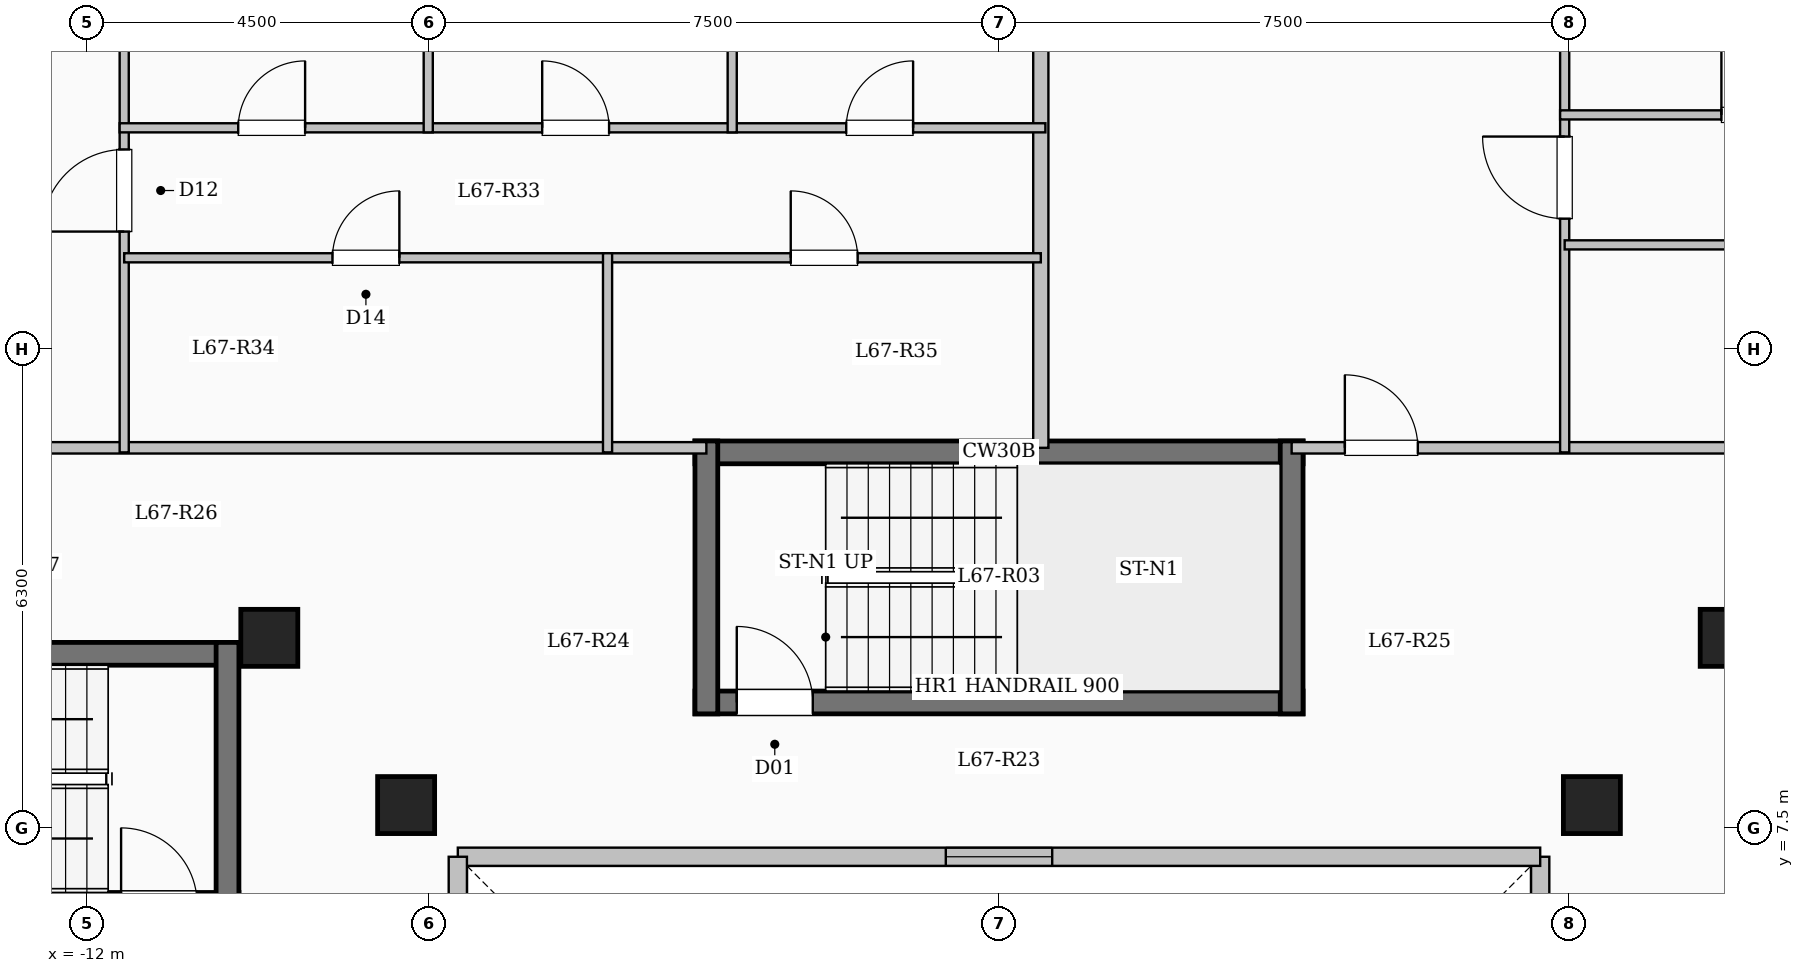
"""IFC4 building model, lengths in metres.
Left out: names, types, materials, properties, quantities, classifications, styles, units other than length and angle.
Written with IfcOpenShell. Run it as: python <this file> out.ifc"""

import sys

from ifc_helpers import new_model, si_unit, direction, frame, frame_2d, origin, origin_2d, place, context, subcontext, project, spatial, rectangle, extrude, element, fill, save


model = new_model("IFC4")
c1 = context("Model", 3, precision=1e-05, world=origin(), true_north=direction((0.0, 1.0)))
c2 = subcontext(c1, "Body", "Model", "MODEL_VIEW")
j1 = project(units=[si_unit("LENGTHUNIT", "METRE"), si_unit("PLANEANGLEUNIT", "RADIAN")], contexts=[c1])
p1 = place(None, origin())
s1 = spatial("IfcSite", under=j1, at=p1, CompositionType="ELEMENT")
p2 = place(p1, origin())
s2 = spatial("IfcBuilding", under=s1, at=p2, CompositionType="ELEMENT")
p3 = place(p2, frame((0.0, 0.0, 248.2)))
s3 = spatial("IfcBuildingStorey", under=s2, at=p3, CompositionType="ELEMENT", Elevation=248.2)
for number, where, z_axis, x_axis in (
    (1, (-7.8, 7.8, 0.0), (0.0, 0.0, 1.0), (1.0, 0.0, 0.0)),
    (2, (7.8, 7.8, 0.0), (0.0, 0.0, 1.0), (1.0, 0.0, 0.0)),
    (3, (-9.6, 10.0, 0.0), (0.0, 0.0, 1.0), (1.0, 0.0, 0.0)),
    (4, (9.6, 10.0, 0.0), (0.0, 0.0, 1.0), (1.0, 0.0, 0.0)),
):
    element("IfcColumn", number, at=place(p3, frame(where, z_axis=z_axis, x_axis=x_axis)), inside=s3, PredefinedType="COLUMN", context=c2, shape_type="SweptSolid", body=[
        extrude(rectangle(XDim=0.75, YDim=0.75, at=origin_2d()), origin(), (0.0, 0.0, 1.0), 3.35),
    ])
p4 = place(p3, frame((7.12, -7.12, 0.0), z_axis=(0.0, 0.0, 1.0), x_axis=(0.0, 1.0, 0.0)))
e5 = element("IfcWall", 5, at=p4, inside=s3, PredefinedType="SOLIDWALL", context=c2, shape_type="SweptSolid", body=[
    extrude(rectangle(XDim=14.24, YDim=0.24, at=frame_2d((7.12, 0.0))), origin(), (0.0, 0.0, 1.0), 3.1),
])
p5 = place(p4, frame((6.42, 0.0, 0.95)))
e6 = element("IfcOpeningElement", 6, at=p5, cuts=e5, PredefinedType="OPENING", context=c2, shape_type="SweptSolid", body=[
    extrude(rectangle(XDim=1.4, YDim=1.5, at=frame_2d((0.7, 0.75))), frame((0.0, 0.13, 0.0), z_axis=(0.0, -1.0, 0.0), x_axis=(1.0, 0.0, 0.0)), (0.0, 0.0, 1.0), 0.26),
])
p6 = place(p3, frame((7.12, 7.12, 0.0), z_axis=(0.0, 0.0, 1.0), x_axis=(-1.0, 0.0, 0.0)))
e7 = element("IfcWall", 7, at=p6, inside=s3, PredefinedType="SOLIDWALL", context=c2, shape_type="SweptSolid", body=[
    extrude(rectangle(XDim=14.24, YDim=0.24, at=frame_2d((7.12, 0.0))), origin(), (0.0, 0.0, 1.0), 3.1),
])
p7 = place(p6, frame((6.42, 0.0, 0.95)))
e8 = element("IfcOpeningElement", 8, at=p7, cuts=e7, PredefinedType="OPENING", context=c2, shape_type="SweptSolid", body=[
    extrude(rectangle(XDim=1.4, YDim=1.5, at=frame_2d((0.7, 0.75))), frame((0.0, 0.13, 0.0), z_axis=(0.0, -1.0, 0.0), x_axis=(1.0, 0.0, 0.0)), (0.0, 0.0, 1.0), 0.26),
])
p8 = place(p3, frame((-7.12, 7.12, 0.0), z_axis=(0.0, 0.0, 1.0), x_axis=(0.0, -1.0, 0.0)))
e9 = element("IfcWall", 9, at=p8, inside=s3, PredefinedType="SOLIDWALL", context=c2, shape_type="SweptSolid", body=[
    extrude(rectangle(XDim=14.24, YDim=0.24, at=frame_2d((7.12, 0.0))), origin(), (0.0, 0.0, 1.0), 3.1),
])
p9 = place(p8, frame((6.42, 0.0, 0.95)))
e10 = element("IfcOpeningElement", 10, at=p9, cuts=e9, PredefinedType="OPENING", context=c2, shape_type="SweptSolid", body=[
    extrude(rectangle(XDim=1.4, YDim=1.5, at=frame_2d((0.7, 0.75))), frame((0.0, 0.13, 0.0), z_axis=(0.0, -1.0, 0.0), x_axis=(1.0, 0.0, 0.0)), (0.0, 0.0, 1.0), 0.26),
])
p10 = place(p3, frame((-18.0, 9.79, 0.0), z_axis=(0.0, 0.0, 1.0), x_axis=(1.0, 0.0, 0.0)))
e11 = element("IfcWall", 11, at=p10, inside=s3, PredefinedType="SHEAR", context=c2, shape_type="SweptSolid", body=[
    extrude(rectangle(XDim=8.0, YDim=0.3, at=frame_2d((4.0, 0.0))), origin(), (0.0, 0.0, 1.0), 3.35),
])
p11 = place(p3, frame((-18.0, 6.5, 0.0), z_axis=(0.0, 0.0, 1.0), x_axis=(1.0, 0.0, 0.0)))
e12 = element("IfcWall", 12, at=p11, inside=s3, PredefinedType="SHEAR", context=c2, shape_type="SweptSolid", body=[
    extrude(rectangle(XDim=8.0, YDim=0.3, at=frame_2d((4.0, 0.0))), origin(), (0.0, 0.0, 1.0), 3.35),
])
p12 = place(p11, frame((6.45, 0.0, 0.0)))
e13 = element("IfcOpeningElement", 13, at=p12, cuts=e12, PredefinedType="OPENING", context=c2, shape_type="SweptSolid", body=[
    extrude(rectangle(XDim=1.0, YDim=2.15, at=frame_2d((0.5, 1.075))), frame((0.0, 0.16, 0.0), z_axis=(0.0, -1.0, 0.0), x_axis=(1.0, 0.0, 0.0)), (0.0, 0.0, 1.0), 0.32),
])
p13 = place(p3, frame((-10.15, 6.35, 0.0), z_axis=(0.0, 0.0, 1.0), x_axis=(0.0, 1.0, 0.0)))
e14 = element("IfcWall", 14, at=p13, inside=s3, PredefinedType="SHEAR", context=c2, shape_type="SweptSolid", body=[
    extrude(rectangle(XDim=3.59, YDim=0.3, at=frame_2d((1.795, 0.0))), origin(), (0.0, 0.0, 1.0), 3.35),
])
p14 = place(p3, frame((-4.0, 12.44, 0.0), z_axis=(0.0, 0.0, 1.0), x_axis=(1.0, 0.0, 0.0)))
e15 = element("IfcWall", 15, at=p14, inside=s3, PredefinedType="SHEAR", context=c2, shape_type="SweptSolid", body=[
    extrude(rectangle(XDim=8.0, YDim=0.3, at=frame_2d((4.0, 0.0))), origin(), (0.0, 0.0, 1.0), 3.35),
])
p15 = place(p3, frame((-4.0, 9.15, 0.0), z_axis=(0.0, 0.0, 1.0), x_axis=(1.0, 0.0, 0.0)))
e16 = element("IfcWall", 16, at=p15, inside=s3, PredefinedType="SHEAR", context=c2, shape_type="SweptSolid", body=[
    extrude(rectangle(XDim=8.0, YDim=0.3, at=frame_2d((4.0, 0.0))), origin(), (0.0, 0.0, 1.0), 3.35),
])
p16 = place(p15, frame((0.55, 0.0, 0.0)))
e17 = element("IfcOpeningElement", 17, at=p16, cuts=e16, PredefinedType="OPENING", context=c2, shape_type="SweptSolid", body=[
    extrude(rectangle(XDim=1.0, YDim=2.15, at=frame_2d((0.5, 1.075))), frame((0.0, 0.16, 0.0), z_axis=(0.0, -1.0, 0.0), x_axis=(1.0, 0.0, 0.0)), (0.0, 0.0, 1.0), 0.32),
])
for number, where, z_axis, x_axis in (
    (18, (-3.85, 9.0, 0.0), (0.0, 0.0, 1.0), (0.0, 1.0, 0.0)),
    (19, (3.85, 9.0, 0.0), (0.0, 0.0, 1.0), (0.0, 1.0, 0.0)),
):
    element("IfcWall", number, at=place(p3, frame(where, z_axis=z_axis, x_axis=x_axis)), inside=s3, PredefinedType="SHEAR", context=c2, shape_type="SweptSolid", body=[
        extrude(rectangle(XDim=3.59, YDim=0.3, at=frame_2d((1.795, 0.0))), origin(), (0.0, 0.0, 1.0), 3.35),
    ])
p17 = place(p3, frame((-17.75, 12.5, 0.0), z_axis=(0.0, 0.0, 1.0), x_axis=(1.0, 0.0, 0.0)))
e20 = element("IfcWall", 20, at=p17, inside=s3, PredefinedType="PARTITIONING", context=c2, shape_type="SweptSolid", body=[
    extrude(rectangle(XDim=13.9, YDim=0.15, at=frame_2d((6.95, 0.0))), origin(), (0.0, 0.0, 1.0), 3.1),
])
p18 = place(p17, frame((0.7, 0.0, 0.0)))
e21 = element("IfcOpeningElement", 21, at=p18, cuts=e20, PredefinedType="OPENING", context=c2, shape_type="SweptSolid", body=[
    extrude(rectangle(XDim=0.96, YDim=2.15, at=frame_2d((0.48, 1.075))), frame((0.0, 0.085, 0.0), z_axis=(0.0, -1.0, 0.0), x_axis=(1.0, 0.0, 0.0)), (0.0, 0.0, 1.0), 0.17),
])
p19 = place(p3, frame((3.85, 12.5, 0.0), z_axis=(0.0, 0.0, 1.0), x_axis=(1.0, 0.0, 0.0)))
e22 = element("IfcWall", 22, at=p19, inside=s3, PredefinedType="PARTITIONING", context=c2, shape_type="SweptSolid", body=[
    extrude(rectangle(XDim=13.9, YDim=0.15, at=frame_2d((6.95, 0.0))), origin(), (0.0, 0.0, 1.0), 3.1),
])
p20 = place(p19, frame((0.7, 0.0, 0.0)))
e23 = element("IfcOpeningElement", 23, at=p20, cuts=e22, PredefinedType="OPENING", context=c2, shape_type="SweptSolid", body=[
    extrude(rectangle(XDim=0.96, YDim=2.15, at=frame_2d((0.48, 1.075))), frame((0.0, 0.085, 0.0), z_axis=(0.0, -1.0, 0.0), x_axis=(1.0, 0.0, 0.0)), (0.0, 0.0, 1.0), 0.17),
])
p21 = place(p3, frame((0.55, 12.5, 0.0), z_axis=(0.0, 0.0, 1.0), x_axis=(0.0, 1.0, 0.0)))
e24 = element("IfcWall", 24, at=p21, inside=s3, PredefinedType="SOLIDWALL", context=c2, shape_type="SweptSolid", body=[
    extrude(rectangle(XDim=9.88, YDim=0.2, at=frame_2d((4.94, 0.0))), origin(), (0.0, 0.0, 1.0), 3.1),
])
p22 = place(p3, frame((-11.509, 12.44, 0.0), z_axis=(0.0, 0.0, 1.0), x_axis=(0.0, 1.0, 0.0)))
e25 = element("IfcWall", 25, at=p22, inside=s3, PredefinedType="PARTITIONING", context=c2, shape_type="SweptSolid", body=[
    extrude(rectangle(XDim=8.46, YDim=0.12, at=frame_2d((4.23, 0.0))), origin(), (0.0, 0.0, 1.0), 3.1),
])
p23 = place(p22, frame((2.905, 0.0, 0.0)))
e26 = element("IfcOpeningElement", 26, at=p23, cuts=e25, PredefinedType="OPENING", context=c2, shape_type="SweptSolid", body=[
    extrude(rectangle(XDim=1.08, YDim=2.15, at=frame_2d((0.54, 1.075))), frame((0.0, 0.07, 0.0), z_axis=(0.0, -1.0, 0.0), x_axis=(1.0, 0.0, 0.0)), (0.0, 0.0, 1.0), 0.14),
])
p24 = place(p3, frame((-11.509, 15.0, 0.0), z_axis=(0.0, 0.0, 1.0), x_axis=(1.0, 0.0, 0.0)))
e27 = element("IfcWall", 27, at=p24, inside=s3, PredefinedType="PARTITIONING", context=c2, shape_type="SweptSolid", body=[
    extrude(rectangle(XDim=6.359, YDim=0.12, at=frame_2d((3.18, 0.0))), origin(), (0.0, 0.0, 1.0), 3.1),
])
p25 = place(p24, frame((2.74, 0.0, 0.0)))
e28 = element("IfcOpeningElement", 28, at=p25, cuts=e27, PredefinedType="OPENING", context=c2, shape_type="SweptSolid", body=[
    extrude(rectangle(XDim=0.88, YDim=2.1, at=frame_2d((0.44, 1.05))), frame((0.0, 0.07, 0.0), z_axis=(0.0, -1.0, 0.0), x_axis=(1.0, 0.0, 0.0)), (0.0, 0.0, 1.0), 0.14),
])
p26 = place(p3, frame((-5.15, 15.0, 0.0), z_axis=(0.0, 0.0, 1.0), x_axis=(1.0, 0.0, 0.0)))
e29 = element("IfcWall", 29, at=p26, inside=s3, PredefinedType="PARTITIONING", context=c2, shape_type="SweptSolid", body=[
    extrude(rectangle(XDim=5.7, YDim=0.12, at=frame_2d((2.85, 0.0))), origin(), (0.0, 0.0, 1.0), 3.1),
])
p27 = place(p26, frame((2.41, 0.0, 0.0)))
e30 = element("IfcOpeningElement", 30, at=p27, cuts=e29, PredefinedType="OPENING", context=c2, shape_type="SweptSolid", body=[
    extrude(rectangle(XDim=0.88, YDim=2.1, at=frame_2d((0.44, 1.05))), frame((0.0, 0.07, 0.0), z_axis=(0.0, -1.0, 0.0), x_axis=(1.0, 0.0, 0.0)), (0.0, 0.0, 1.0), 0.14),
])
p28 = place(p3, frame((-11.569, 16.71, 0.0), z_axis=(0.0, 0.0, 1.0), x_axis=(1.0, 0.0, 0.0)))
e31 = element("IfcWall", 31, at=p28, inside=s3, PredefinedType="PARTITIONING", context=c2, shape_type="SweptSolid", body=[
    extrude(rectangle(XDim=12.179, YDim=0.12, at=frame_2d((6.09, 0.0))), origin(), (0.0, 0.0, 1.0), 2.785),
])
p29 = place(p28, frame((1.56, 0.0, 0.0)))
e32 = element("IfcOpeningElement", 32, at=p29, cuts=e31, PredefinedType="OPENING", context=c2, shape_type="SweptSolid", body=[
    extrude(rectangle(XDim=0.88, YDim=2.1, at=frame_2d((0.44, 1.05))), frame((0.0, 0.07, 0.0), z_axis=(0.0, -1.0, 0.0), x_axis=(1.0, 0.0, 0.0)), (0.0, 0.0, 1.0), 0.14),
])
p30 = place(p28, frame((5.559, 0.0, 0.0)))
e33 = element("IfcOpeningElement", 33, at=p30, cuts=e31, PredefinedType="OPENING", context=c2, shape_type="SweptSolid", body=[
    extrude(rectangle(XDim=0.88, YDim=2.1, at=frame_2d((0.44, 1.05))), frame((0.0, 0.07, 0.0), z_axis=(0.0, -1.0, 0.0), x_axis=(1.0, 0.0, 0.0)), (0.0, 0.0, 1.0), 0.14),
])
p31 = place(p28, frame((9.559, 0.0, 0.0)))
e34 = element("IfcOpeningElement", 34, at=p31, cuts=e31, PredefinedType="OPENING", context=c2, shape_type="SweptSolid", body=[
    extrude(rectangle(XDim=0.88, YDim=2.1, at=frame_2d((0.44, 1.05))), frame((0.0, 0.07, 0.0), z_axis=(0.0, -1.0, 0.0), x_axis=(1.0, 0.0, 0.0)), (0.0, 0.0, 1.0), 0.14),
])
p32 = place(p3, frame((-5.15, 12.44, 0.0), z_axis=(0.0, 0.0, 1.0), x_axis=(0.0, 1.0, 0.0)))
e35 = element("IfcWall", 35, at=p32, inside=s3, PredefinedType="PARTITIONING", context=c2, shape_type="SweptSolid", body=[
    extrude(rectangle(XDim=2.62, YDim=0.12, at=frame_2d((1.31, 0.0))), origin(), (0.0, 0.0, 1.0), 3.1),
])
p33 = place(p3, frame((-7.509, 16.65, 0.0), z_axis=(0.0, 0.0, 1.0), x_axis=(0.0, 1.0, 0.0)))
e36 = element("IfcWall", 36, at=p33, inside=s3, PredefinedType="PARTITIONING", context=c2, shape_type="SweptSolid", body=[
    extrude(rectangle(XDim=5.111, YDim=0.12, at=frame_2d((2.556, 0.0))), origin(), (0.0, 0.0, 1.0), 2.685),
])
p34 = place(p3, frame((-3.51, 16.65, 0.0), z_axis=(0.0, 0.0, 1.0), x_axis=(0.0, 1.0, 0.0)))
e37 = element("IfcWall", 37, at=p34, inside=s3, PredefinedType="PARTITIONING", context=c2, shape_type="SweptSolid", body=[
    extrude(rectangle(XDim=5.73, YDim=0.12, at=frame_2d((2.865, 0.0))), origin(), (0.0, 0.0, 1.0), 3.1),
])
p35 = place(p3, frame((7.442, 12.44, 0.0), z_axis=(0.0, 0.0, 1.0), x_axis=(0.0, 1.0, 0.0)))
e38 = element("IfcWall", 38, at=p35, inside=s3, PredefinedType="PARTITIONING", context=c2, shape_type="SweptSolid", body=[
    extrude(rectangle(XDim=9.338, YDim=0.12, at=frame_2d((4.669, 0.0))), origin(), (0.0, 0.0, 1.0), 2.685),
])
p36 = place(p35, frame((3.075, 0.0, 0.0)))
e39 = element("IfcOpeningElement", 39, at=p36, cuts=e38, PredefinedType="OPENING", context=c2, shape_type="SweptSolid", body=[
    extrude(rectangle(XDim=1.08, YDim=2.15, at=frame_2d((0.54, 1.075))), frame((0.0, 0.07, 0.0), z_axis=(0.0, -1.0, 0.0), x_axis=(1.0, 0.0, 0.0)), (0.0, 0.0, 1.0), 0.14),
])
p37 = place(p3, frame((7.442, 15.17, 0.0), z_axis=(0.0, 0.0, 1.0), x_axis=(1.0, 0.0, 0.0)))
e40 = element("IfcWall", 40, at=p37, inside=s3, PredefinedType="PARTITIONING", context=c2, shape_type="SweptSolid", body=[
    extrude(rectangle(XDim=5.841, YDim=0.12, at=frame_2d((2.92, 0.0))), origin(), (0.0, 0.0, 1.0), 3.1),
])
p38 = place(p37, frame((2.48, 0.0, 0.0)))
e41 = element("IfcOpeningElement", 41, at=p38, cuts=e40, PredefinedType="OPENING", context=c2, shape_type="SweptSolid", body=[
    extrude(rectangle(XDim=0.88, YDim=2.1, at=frame_2d((0.44, 1.05))), frame((0.0, 0.07, 0.0), z_axis=(0.0, -1.0, 0.0), x_axis=(1.0, 0.0, 0.0)), (0.0, 0.0, 1.0), 0.14),
])
p39 = place(p3, frame((7.382, 16.88, 0.0), z_axis=(0.0, 0.0, 1.0), x_axis=(1.0, 0.0, 0.0)))
e42 = element("IfcWall", 42, at=p39, inside=s3, PredefinedType="PARTITIONING", context=c2, shape_type="SweptSolid", body=[
    extrude(rectangle(XDim=10.428, YDim=0.12, at=frame_2d((5.214, 0.0))), origin(), (0.0, 0.0, 1.0), 2.785),
])
p40 = place(p39, frame((2.122, 0.0, 0.0)))
e43 = element("IfcOpeningElement", 43, at=p40, cuts=e42, PredefinedType="OPENING", context=c2, shape_type="SweptSolid", body=[
    extrude(rectangle(XDim=0.88, YDim=2.1, at=frame_2d((0.44, 1.05))), frame((0.0, 0.07, 0.0), z_axis=(0.0, -1.0, 0.0), x_axis=(1.0, 0.0, 0.0)), (0.0, 0.0, 1.0), 0.14),
])
p41 = place(p39, frame((7.246, 0.0, 0.0)))
e44 = element("IfcOpeningElement", 44, at=p41, cuts=e42, PredefinedType="OPENING", context=c2, shape_type="SweptSolid", body=[
    extrude(rectangle(XDim=0.88, YDim=2.1, at=frame_2d((0.44, 1.05))), frame((0.0, 0.07, 0.0), z_axis=(0.0, -1.0, 0.0), x_axis=(1.0, 0.0, 0.0)), (0.0, 0.0, 1.0), 0.14),
])
p42 = place(p7, origin())
e45 = element("IfcWindow", 45, at=p42, inside=s3, PartitioningType="SINGLE_PANEL", PredefinedType="WINDOW", context=c2, shape_type="SweptSolid", body=[
    extrude(rectangle(XDim=1.4, YDim=1.5, at=frame_2d((0.7, 0.75))), frame((0.0, 0.03, 0.0), z_axis=(0.0, -1.0, 0.0), x_axis=(1.0, 0.0, 0.0)), (0.0, 0.0, 1.0), 0.06),
])
fill(e8, e45)
p43 = place(p16, origin())
e46 = element("IfcDoor", 46, at=p43, inside=s3, OperationType="SINGLE_SWING_LEFT", PredefinedType="DOOR", context=c2, shape_type="SweptSolid", body=[
    extrude(rectangle(XDim=1.0, YDim=2.15, at=frame_2d((0.5, 1.075))), frame((0.0, 0.025, 0.0), z_axis=(0.0, -1.0, 0.0), x_axis=(1.0, 0.0, 0.0)), (0.0, 0.0, 1.0), 0.05),
])
fill(e17, e46)
p44 = place(p23, origin())
e47 = element("IfcDoor", 47, at=p44, inside=s3, OperationType="SINGLE_SWING_LEFT", PredefinedType="DOOR", context=c2, shape_type="SweptSolid", body=[
    extrude(rectangle(XDim=1.08, YDim=2.15, at=frame_2d((0.54, 1.075))), frame((0.0, 0.025, 0.0), z_axis=(0.0, -1.0, 0.0), x_axis=(1.0, 0.0, 0.0)), (0.0, 0.0, 1.0), 0.05),
])
fill(e26, e47)
p45 = place(p25, origin())
e48 = element("IfcDoor", 48, at=p45, inside=s3, OperationType="SINGLE_SWING_RIGHT", PredefinedType="DOOR", context=c2, shape_type="SweptSolid", body=[
    extrude(rectangle(XDim=0.88, YDim=2.1, at=frame_2d((0.44, 1.05))), frame((0.0, 0.025, 0.0), z_axis=(0.0, -1.0, 0.0), x_axis=(1.0, 0.0, 0.0)), (0.0, 0.0, 1.0), 0.05),
])
fill(e28, e48)
p46 = place(p27, origin())
e49 = element("IfcDoor", 49, at=p46, inside=s3, OperationType="SINGLE_SWING_LEFT", PredefinedType="DOOR", context=c2, shape_type="SweptSolid", body=[
    extrude(rectangle(XDim=0.88, YDim=2.1, at=frame_2d((0.44, 1.05))), frame((0.0, 0.025, 0.0), z_axis=(0.0, -1.0, 0.0), x_axis=(1.0, 0.0, 0.0)), (0.0, 0.0, 1.0), 0.05),
])
fill(e30, e49)
p47 = place(p29, origin())
e50 = element("IfcDoor", 50, at=p47, inside=s3, OperationType="SINGLE_SWING_RIGHT", PredefinedType="DOOR", context=c2, shape_type="SweptSolid", body=[
    extrude(rectangle(XDim=0.88, YDim=2.1, at=frame_2d((0.44, 1.05))), frame((0.0, 0.025, 0.0), z_axis=(0.0, -1.0, 0.0), x_axis=(1.0, 0.0, 0.0)), (0.0, 0.0, 1.0), 0.05),
])
fill(e32, e50)
p48 = place(p30, origin())
e51 = element("IfcDoor", 51, at=p48, inside=s3, OperationType="SINGLE_SWING_LEFT", PredefinedType="DOOR", context=c2, shape_type="SweptSolid", body=[
    extrude(rectangle(XDim=0.88, YDim=2.1, at=frame_2d((0.44, 1.05))), frame((0.0, 0.025, 0.0), z_axis=(0.0, -1.0, 0.0), x_axis=(1.0, 0.0, 0.0)), (0.0, 0.0, 1.0), 0.05),
])
fill(e33, e51)
p49 = place(p31, origin())
e52 = element("IfcDoor", 52, at=p49, inside=s3, OperationType="SINGLE_SWING_RIGHT", PredefinedType="DOOR", context=c2, shape_type="SweptSolid", body=[
    extrude(rectangle(XDim=0.88, YDim=2.1, at=frame_2d((0.44, 1.05))), frame((0.0, 0.025, 0.0), z_axis=(0.0, -1.0, 0.0), x_axis=(1.0, 0.0, 0.0)), (0.0, 0.0, 1.0), 0.05),
])
fill(e34, e52)
p50 = place(p20, origin())
e53 = element("IfcDoor", 53, at=p50, inside=s3, OperationType="SINGLE_SWING_LEFT", PredefinedType="DOOR", context=c2, shape_type="SweptSolid", body=[
    extrude(rectangle(XDim=0.96, YDim=2.15, at=frame_2d((0.48, 1.075))), frame((0.0, 0.025, 0.0), z_axis=(0.0, -1.0, 0.0), x_axis=(1.0, 0.0, 0.0)), (0.0, 0.0, 1.0), 0.05),
])
fill(e23, e53)
p51 = place(p36, origin())
e54 = element("IfcDoor", 54, at=p51, inside=s3, OperationType="SINGLE_SWING_RIGHT", PredefinedType="DOOR", context=c2, shape_type="SweptSolid", body=[
    extrude(rectangle(XDim=1.08, YDim=2.15, at=frame_2d((0.54, 1.075))), frame((0.0, 0.025, 0.0), z_axis=(0.0, -1.0, 0.0), x_axis=(1.0, 0.0, 0.0)), (0.0, 0.0, 1.0), 0.05),
])
fill(e39, e54)
p52 = place(p40, origin())
e55 = element("IfcDoor", 55, at=p52, inside=s3, OperationType="SINGLE_SWING_LEFT", PredefinedType="DOOR", context=c2, shape_type="SweptSolid", body=[
    extrude(rectangle(XDim=0.88, YDim=2.1, at=frame_2d((0.44, 1.05))), frame((0.0, 0.025, 0.0), z_axis=(0.0, -1.0, 0.0), x_axis=(1.0, 0.0, 0.0)), (0.0, 0.0, 1.0), 0.05),
])
fill(e43, e55)
save(model, sys.argv[1])
